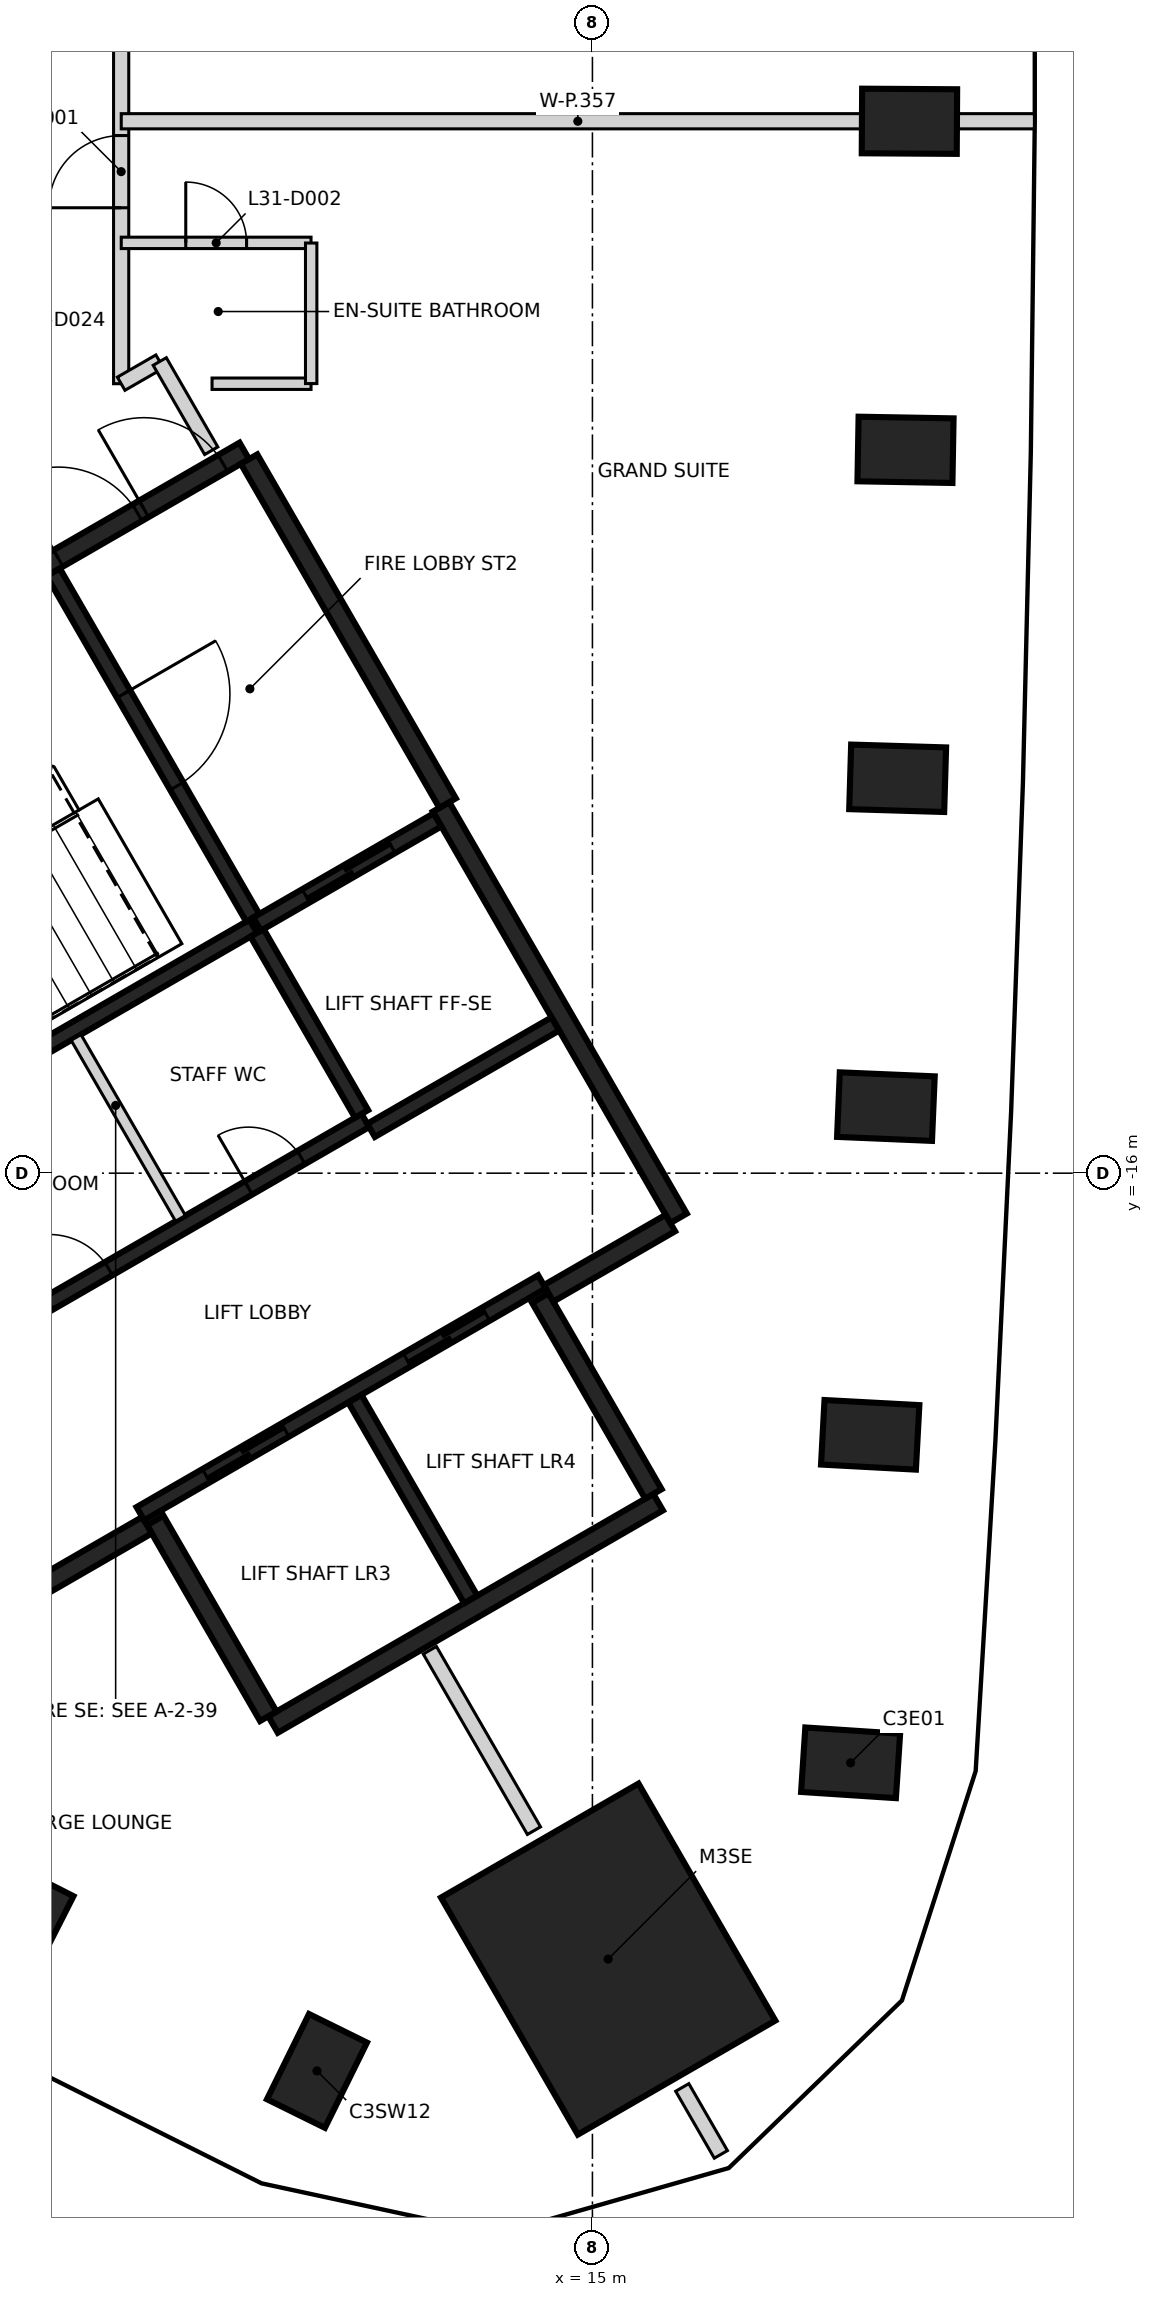
"""IFC4 building model, lengths in metres.
Left out: names, types, materials, properties, quantities, classifications, styles, units other than length and angle.
Written with IfcOpenShell. Run it as: python <this file> out.ifc"""

import sys

from ifc_helpers import new_model, si_unit, direction, frame, frame_2d, origin, origin_2d, place, context, subcontext, project, spatial, rectangle, extrude, element, fill, save


model = new_model("IFC4")
c1 = context("Model", 3, precision=1e-05, world=origin(), true_north=direction((0.0, 1.0)))
c2 = subcontext(c1, "Body", "Model", "MODEL_VIEW")
j1 = project(units=[si_unit("LENGTHUNIT", "METRE"), si_unit("PLANEANGLEUNIT", "RADIAN")], contexts=[c1])
p1 = place(None, origin())
s1 = spatial("IfcSite", under=j1, at=p1, CompositionType="ELEMENT")
p2 = place(p1, origin())
s2 = spatial("IfcBuilding", under=s1, at=p2, CompositionType="ELEMENT")
p3 = place(p2, frame((0.0, 0.0, 128.8)))
s3 = spatial("IfcBuildingStorey", under=s2, at=p3, CompositionType="ELEMENT", Elevation=128.8)
for number, where, z_axis, x_axis in (
    (1, (18.397, -23.757, -0.4), (0.0, 0.0, 1.0), (-0.998, 0.065, 0.0)),
    (2, (18.655, -19.442, -0.4), (0.0, 0.0, 1.0), (-0.999, 0.054, 0.0)),
    (3, (18.861, -15.124, -0.4), (0.0, 0.0, 1.0), (-0.999, 0.042, 0.0)),
    (4, (19.016, -10.805, -0.4), (0.0, 0.0, 1.0), (-1.0, 0.03, 0.0)),
    (5, (19.119, -6.484, -0.4), (0.0, 0.0, 1.0), (-1.0, 0.018, 0.0)),
    (6, (19.171, -2.161, -0.4), (0.0, 0.0, 1.0), (-1.0, 0.006, 0.0)),
    (7, (7.51, -25.876, -0.4), (0.0, 0.0, 1.0), (0.453, 0.892, 0.0)),
    (8, (11.376, -27.811, -0.4), (0.0, 0.0, 1.0), (0.442, 0.897, 0.0)),
):
    element("IfcColumn", number, at=place(p3, frame(where, z_axis=z_axis, x_axis=x_axis)), inside=s3, PredefinedType="COLUMN", context=c2, shape_type="SweptSolid", body=[
        extrude(rectangle(XDim=1.25, YDim=0.85, at=origin_2d()), origin(), (0.0, 0.0, 1.0), 3.6),
    ])
p4 = place(p3, frame((15.207, -26.34, -0.4), z_axis=(0.0, 0.0, 1.0), x_axis=(-0.5, 0.866025403784, 0.0)))
e9 = element("IfcColumn", 9, at=p4, inside=s3, PredefinedType="COLUMN", context=c2, shape_type="SweptSolid", body=[
    extrude(rectangle(XDim=3.6, YDim=3.0, at=origin_2d()), origin(), (0.0, 0.0, 1.0), 3.6),
])
p5 = place(p3, frame((0.417, -12.273, 0.0), z_axis=(0.0, 0.0, 1.0), x_axis=(0.866021906294, 0.500006057782, 0.0)))
e10 = element("IfcWall", 10, at=p5, inside=s3, PredefinedType="SHEAR", context=c2, shape_type="SweptSolid", body=[
    extrude(rectangle(XDim=11.55, YDim=0.25, at=frame_2d((5.775, 0.0))), origin(), (0.0, 0.0, 1.0), 3.2),
])
p6 = place(p5, frame((10.025, 0.0, 0.0)))
e11 = element("IfcOpeningElement", 11, at=p6, cuts=e10, PredefinedType="OPENING", context=c2, shape_type="SweptSolid", body=[
    extrude(rectangle(XDim=1.2, YDim=2.1, at=frame_2d((0.6, 1.05))), frame((0.0, 0.135, 0.0), z_axis=(0.0, -1.0, 0.0), x_axis=(1.0, 0.0, 0.0)), (0.0, 0.0, 1.0), 0.27),
])
p7 = place(p5, frame((8.725, 0.0, 0.0)))
e12 = element("IfcOpeningElement", 12, at=p7, cuts=e10, PredefinedType="OPENING", context=c2, shape_type="SweptSolid", body=[
    extrude(rectangle(XDim=1.2, YDim=2.1, at=frame_2d((0.6, 1.05))), frame((0.0, 0.135, 0.0), z_axis=(0.0, -1.0, 0.0), x_axis=(1.0, 0.0, 0.0)), (0.0, 0.0, 1.0), 0.27),
])
p8 = place(p3, frame((13.008, -11.181, 0.0), z_axis=(0.0, 0.0, 1.0), x_axis=(0.500004234368, -0.866022959057, 0.0)))
e13 = element("IfcWall", 13, at=p8, inside=s3, PredefinedType="SHEAR", context=c2, shape_type="SweptSolid", body=[
    extrude(rectangle(XDim=6.25, YDim=0.25, at=frame_2d((3.125, 0.0))), origin(), (0.0, 0.0, 1.0), 3.2),
])
p9 = place(p3, frame((15.865, -20.328, 0.0), z_axis=(0.0, 0.0, 1.0), x_axis=(-0.86602852612, -0.499994591916, 0.0)))
e14 = element("IfcWall", 14, at=p9, inside=s3, PredefinedType="SHEAR", context=c2, shape_type="SweptSolid", body=[
    extrude(rectangle(XDim=5.85, YDim=0.25, at=frame_2d((2.925, 0.0))), origin(), (0.0, 0.0, 1.0), 3.2),
])
p10 = place(p3, frame((10.483, -6.606, 0.0), z_axis=(0.0, 0.0, 1.0), x_axis=(0.49999885962, -0.866026062182, 0.0)))
e15 = element("IfcWall", 15, at=p10, inside=s3, PredefinedType="SHEAR", context=c2, shape_type="SweptSolid", body=[
    extrude(rectangle(XDim=5.225, YDim=0.25, at=frame_2d((2.612, 0.0))), origin(), (0.0, 0.0, 1.0), 3.2),
])
for number, where, z_axis, x_axis in (
    (16, (14.315, -17.644, 0.0), (0.0, 0.0, 1.0), (0.5, -0.866, 0.0)),
    (17, (10.736, -23.145, 0.0), (0.0, 0.0, 1.0), (-0.5, 0.866, 0.0)),
):
    element("IfcWall", number, at=place(p3, frame(where, z_axis=z_axis, x_axis=x_axis)), inside=s3, PredefinedType="SHEAR", context=c2, shape_type="SweptSolid", body=[
        extrude(rectangle(XDim=2.974, YDim=0.25, at=frame_2d((1.487, 0.0))), origin(), (0.0, 0.0, 1.0), 3.2),
    ])
p11 = place(p3, frame((9.14, -20.631, 0.0), z_axis=(0.0, 0.0, 1.0), x_axis=(-0.866043531843, -0.499968599967, 0.0)))
e18 = element("IfcWall", 18, at=p11, inside=s3, PredefinedType="SHEAR", context=c2, shape_type="SweptSolid", body=[
    extrude(rectangle(XDim=1.975, YDim=0.25, at=frame_2d((0.987, 0.0))), origin(), (0.0, 0.0, 1.0), 3.2),
])
p12 = place(p3, frame((16.025, -16.656, 0.0), z_axis=(0.0, 0.0, 1.0), x_axis=(-0.866016279763, -0.500015802937, 0.0)))
e19 = element("IfcWall", 19, at=p12, inside=s3, PredefinedType="SHEAR", context=c2, shape_type="SweptSolid", body=[
    extrude(rectangle(XDim=1.849, YDim=0.25, at=frame_2d((0.925, 0.0))), origin(), (0.0, 0.0, 1.0), 3.2),
])
p13 = place(p3, frame((9.052, -20.48, 0.0), z_axis=(0.0, 0.0, 1.0), x_axis=(0.866030299012, 0.499991521122, 0.0)))
e20 = element("IfcWall", 20, at=p13, inside=s3, PredefinedType="SHEAR", context=c2, shape_type="SweptSolid", body=[
    extrude(rectangle(XDim=6.1, YDim=0.2, at=frame_2d((3.05, 0.0))), origin(), (0.0, 0.0, 1.0), 3.2),
])
p14 = place(p13, frame((1.0, 0.0, 0.0)))
e21 = element("IfcOpeningElement", 21, at=p14, cuts=e20, PredefinedType="OPENING", context=c2, shape_type="SweptSolid", body=[
    extrude(rectangle(XDim=1.2, YDim=2.1, at=frame_2d((0.6, 1.05))), frame((0.0, 0.11, 0.0), z_axis=(0.0, -1.0, 0.0), x_axis=(1.0, 0.0, 0.0)), (0.0, 0.0, 1.0), 0.22),
])
p15 = place(p13, frame((4.05, 0.0, 0.0)))
e22 = element("IfcOpeningElement", 22, at=p15, cuts=e20, PredefinedType="OPENING", context=c2, shape_type="SweptSolid", body=[
    extrude(rectangle(XDim=1.2, YDim=2.1, at=frame_2d((0.6, 1.05))), frame((0.0, 0.11, 0.0), z_axis=(0.0, -1.0, 0.0), x_axis=(1.0, 0.0, 0.0)), (0.0, 0.0, 1.0), 0.22),
])
p16 = place(p3, frame((10.538, -12.752, 0.0), z_axis=(0.0, 0.0, 1.0), x_axis=(-0.866038630372, -0.499977090179, 0.0)))
e23 = element("IfcWall", 23, at=p16, inside=s3, PredefinedType="SHEAR", context=c2, shape_type="SweptSolid", body=[
    extrude(rectangle(XDim=5.699, YDim=0.2, at=frame_2d((2.85, 0.0))), origin(), (0.0, 0.0, 1.0), 3.2),
])
p17 = place(p3, frame((7.077, -18.156, 0.0), z_axis=(0.0, 0.0, 1.0), x_axis=(0.866038630372, 0.499977090179, 0.0)))
e24 = element("IfcWall", 24, at=p17, inside=s3, PredefinedType="SHEAR", context=c2, shape_type="SweptSolid", body=[
    extrude(rectangle(XDim=5.699, YDim=0.2, at=frame_2d((2.85, 0.0))), origin(), (0.0, 0.0, 1.0), 3.2),
])
p18 = place(p17, frame((0.899, 0.0, 0.0)))
e25 = element("IfcOpeningElement", 25, at=p18, cuts=e24, PredefinedType="OPENING", context=c2, shape_type="SweptSolid", body=[
    extrude(rectangle(XDim=0.9, YDim=2.1, at=frame_2d((0.45, 1.05))), frame((0.0, 0.11, 0.0), z_axis=(0.0, -1.0, 0.0), x_axis=(1.0, 0.0, 0.0)), (0.0, 0.0, 1.0), 0.22),
])
p19 = place(p17, frame((3.924, 0.0, 0.0)))
e26 = element("IfcOpeningElement", 26, at=p19, cuts=e24, PredefinedType="OPENING", context=c2, shape_type="SweptSolid", body=[
    extrude(rectangle(XDim=0.8, YDim=2.1, at=frame_2d((0.4, 1.05))), frame((0.0, 0.11, 0.0), z_axis=(0.0, -1.0, 0.0), x_axis=(1.0, 0.0, 0.0)), (0.0, 0.0, 1.0), 0.22),
])
p20 = place(p3, frame((7.906, -8.094, 0.0), z_axis=(0.0, 0.0, 1.0), x_axis=(0.500024287448, -0.866011380966, 0.0)))
e27 = element("IfcWall", 27, at=p20, inside=s3, PredefinedType="SHEAR", context=c2, shape_type="SweptSolid", body=[
    extrude(rectangle(XDim=5.251, YDim=0.2, at=frame_2d((2.625, 0.0))), origin(), (0.0, 0.0, 1.0), 3.2),
])
p21 = place(p20, frame((1.849, 0.0, 0.0)))
e28 = element("IfcOpeningElement", 28, at=p21, cuts=e27, PredefinedType="OPENING", context=c2, shape_type="SweptSolid", body=[
    extrude(rectangle(XDim=1.4, YDim=2.1, at=frame_2d((0.7, 1.05))), frame((0.0, 0.11, 0.0), z_axis=(0.0, -1.0, 0.0), x_axis=(1.0, 0.0, 0.0)), (0.0, 0.0, 1.0), 0.22),
])
p22 = place(p3, frame((11.875, -18.967, 0.0), z_axis=(0.0, 0.0, 1.0), x_axis=(0.49998131003, -0.866036194175, 0.0)))
e29 = element("IfcWall", 29, at=p22, inside=s3, PredefinedType="SHEAR", context=c2, shape_type="SweptSolid", body=[
    extrude(rectangle(XDim=3.048, YDim=0.2, at=frame_2d((1.524, 0.0))), origin(), (0.0, 0.0, 1.0), 3.2),
])
p23 = place(p3, frame((11.963, -15.22, 0.0), z_axis=(0.0, 0.0, 1.0), x_axis=(-0.500034990121, 0.866005201286, 0.0)))
e30 = element("IfcWall", 30, at=p23, inside=s3, PredefinedType="SHEAR", context=c2, shape_type="SweptSolid", body=[
    extrude(rectangle(XDim=2.75, YDim=0.2, at=frame_2d((1.375, 0.0))), origin(), (0.0, 0.0, 1.0), 3.2),
])
p24 = place(p3, frame((10.587, -12.723, 0.0), z_axis=(0.0, 0.0, 1.0), x_axis=(0.866037306777, 0.499979382845, 0.0)))
e31 = element("IfcWall", 31, at=p24, inside=s3, PredefinedType="SHEAR", context=c2, shape_type="SweptSolid", body=[
    extrude(rectangle(XDim=2.742, YDim=0.2, at=frame_2d((1.371, 0.0))), origin(), (0.0, 0.0, 1.0), 3.2),
])
p25 = place(p24, frame((0.743, 0.0, 0.0)))
e32 = element("IfcOpeningElement", 32, at=p25, cuts=e31, PredefinedType="OPENING", context=c2, shape_type="SweptSolid", body=[
    extrude(rectangle(XDim=1.3, YDim=2.1, at=frame_2d((0.65, 1.05))), frame((0.0, 0.11, 0.0), z_axis=(0.0, -1.0, 0.0), x_axis=(1.0, 0.0, 0.0)), (0.0, 0.0, 1.0), 0.22),
])
p26 = place(p3, frame((14.512, -14.037, 0.0), z_axis=(0.0, 0.0, 1.0), x_axis=(-0.866044696403, -0.499966582715, 0.0)))
e33 = element("IfcWall", 33, at=p26, inside=s3, PredefinedType="SHEAR", context=c2, shape_type="SweptSolid", body=[
    extrude(rectangle(XDim=2.799, YDim=0.2, at=frame_2d((1.399, 0.0))), origin(), (0.0, 0.0, 1.0), 3.2),
])
p27 = place(p3, frame((8.207, -14.214, 0.0), z_axis=(0.0, 0.0, 1.0), x_axis=(0.50002746344, -0.86600954718, 0.0)))
e34 = element("IfcWall", 34, at=p27, inside=s3, PredefinedType="PARTITIONING", context=c2, shape_type="SweptSolid", body=[
    extrude(rectangle(XDim=2.748, YDim=0.15, at=frame_2d((1.374, 0.0))), origin(), (0.0, 0.0, 1.0), 3.2),
])
p28 = place(p3, frame((8.8, -5.614, 0.0), z_axis=(0.0, 0.0, 1.0), x_axis=(0.0, 1.0, 0.0)))
e35 = element("IfcWall", 35, at=p28, inside=s3, PredefinedType="PARTITIONING", context=c2, shape_type="SweptSolid", body=[
    extrude(rectangle(XDim=9.692, YDim=0.2, at=frame_2d((4.846, 0.0))), origin(), (0.0, 0.0, 1.0), 3.2),
])
p29 = place(p28, frame((2.315, 0.0, 0.0)))
e36 = element("IfcOpeningElement", 36, at=p29, cuts=e35, PredefinedType="OPENING", context=c2, shape_type="SweptSolid", body=[
    extrude(rectangle(XDim=0.95, YDim=2.1, at=frame_2d((0.475, 1.05))), frame((0.0, 0.11, 0.0), z_axis=(0.0, -1.0, 0.0), x_axis=(1.0, 0.0, 0.0)), (0.0, 0.0, 1.0), 0.22),
])
p30 = place(p28, frame((5.114, 0.0, 0.0)))
e37 = element("IfcOpeningElement", 37, at=p30, cuts=e35, PredefinedType="OPENING", context=c2, shape_type="SweptSolid", body=[
    extrude(rectangle(XDim=1.0, YDim=2.1, at=frame_2d((0.5, 1.05))), frame((0.0, 0.11, 0.0), z_axis=(0.0, -1.0, 0.0), x_axis=(1.0, 0.0, 0.0)), (0.0, 0.0, 1.0), 0.22),
])
p31 = place(p3, frame((8.8, -5.614, 0.0), z_axis=(0.0, 0.0, 1.0), x_axis=(0.866491166515, 0.499192406143, 0.0)))
e38 = element("IfcWall", 38, at=p31, inside=s3, PredefinedType="PARTITIONING", context=c2, shape_type="SweptSolid", body=[
    extrude(rectangle(XDim=0.585, YDim=0.2, at=frame_2d((0.292, 0.0))), origin(), (0.0, 0.0, 1.0), 3.2),
])
p32 = place(p3, frame((9.308, -5.322, 0.0), z_axis=(0.0, 0.0, 1.0), x_axis=(0.499644515495, -0.866230545603, 0.0)))
e39 = element("IfcWall", 39, at=p32, inside=s3, PredefinedType="PARTITIONING", context=c2, shape_type="SweptSolid", body=[
    extrude(rectangle(XDim=1.356, YDim=0.2, at=frame_2d((0.678, 0.0))), origin(), (0.0, 0.0, 1.0), 3.2),
])
p33 = place(p3, frame((8.801, -2.161, 0.0), z_axis=(0.0, 0.0, 1.0), x_axis=(1.0, 0.0, 0.0)))
e40 = element("IfcWall", 40, at=p33, inside=s3, PredefinedType="PARTITIONING", context=c2, shape_type="SweptSolid", body=[
    extrude(rectangle(XDim=12.014, YDim=0.2, at=frame_2d((6.007, 0.0))), origin(), (0.0, 0.0, 1.0), 3.2),
])
p34 = place(p3, frame((12.861, -22.276, 0.0), z_axis=(0.0, 0.0, 1.0), x_axis=(0.49982784299, -0.866124775868, 0.0)))
e41 = element("IfcWall", 41, at=p34, inside=s3, PredefinedType="PARTITIONING", context=c2, shape_type="SweptSolid", body=[
    extrude(rectangle(XDim=2.741, YDim=0.2, at=frame_2d((1.37, 0.0))), origin(), (0.0, 0.0, 1.0), 3.2),
])
p35 = place(p3, frame((16.182, -28.028, 0.0), z_axis=(0.0, 0.0, 1.0), x_axis=(0.499625455419, -0.866241539236, 0.0)))
e42 = element("IfcWall", 42, at=p35, inside=s3, PredefinedType="PARTITIONING", context=c2, shape_type="SweptSolid", body=[
    extrude(rectangle(XDim=1.017, YDim=0.2, at=frame_2d((0.508, 0.0))), origin(), (0.0, 0.0, 1.0), 3.2),
])
p36 = place(p3, frame((8.801, -3.761, 0.0), z_axis=(0.0, 0.0, 1.0), x_axis=(1.0, 0.0, 0.0)))
e43 = element("IfcWall", 43, at=p36, inside=s3, PredefinedType="PARTITIONING", context=c2, shape_type="SweptSolid", body=[
    extrude(rectangle(XDim=2.497, YDim=0.15, at=frame_2d((1.249, 0.0))), origin(), (0.0, 0.0, 1.0), 3.2),
])
p37 = place(p36, frame((0.849, 0.0, 0.0)))
e44 = element("IfcOpeningElement", 44, at=p37, cuts=e43, PredefinedType="OPENING", context=c2, shape_type="SweptSolid", body=[
    extrude(rectangle(XDim=0.8, YDim=2.1, at=frame_2d((0.4, 1.05))), frame((0.0, 0.085, 0.0), z_axis=(0.0, -1.0, 0.0), x_axis=(1.0, 0.0, 0.0)), (0.0, 0.0, 1.0), 0.17),
])
p38 = place(p3, frame((11.298, -5.614, 0.0), z_axis=(0.0, 0.0, 1.0), x_axis=(-1.0, 0.0, 0.0)))
e45 = element("IfcWall", 45, at=p38, inside=s3, PredefinedType="PARTITIONING", context=c2, shape_type="SweptSolid", body=[
    extrude(rectangle(XDim=1.302, YDim=0.15, at=frame_2d((0.651, 0.0))), origin(), (0.0, 0.0, 1.0), 3.2),
])
p39 = place(p3, frame((11.3, -5.612, 0.0), z_axis=(0.0, 0.0, 1.0), x_axis=(0.0, 1.0, 0.0)))
e46 = element("IfcWall", 46, at=p39, inside=s3, PredefinedType="PARTITIONING", context=c2, shape_type="SweptSolid", body=[
    extrude(rectangle(XDim=1.849, YDim=0.15, at=frame_2d((0.925, 0.0))), origin(), (0.0, 0.0, 1.0), 3.2),
])
p40 = place(p25, origin())
e47 = element("IfcDoor", 47, at=p40, inside=s3, OperationType="SLIDING_TO_RIGHT", PredefinedType="DOOR", context=c2, shape_type="SweptSolid", body=[
    extrude(rectangle(XDim=1.3, YDim=2.1, at=frame_2d((0.65, 1.05))), frame((0.0, 0.025, 0.0), z_axis=(0.0, -1.0, 0.0), x_axis=(1.0, 0.0, 0.0)), (0.0, 0.0, 1.0), 0.05),
])
fill(e32, e47)
p41 = place(p14, origin())
e48 = element("IfcDoor", 48, at=p41, inside=s3, OperationType="DOUBLE_DOOR_SLIDING", PredefinedType="DOOR", context=c2, shape_type="SweptSolid", body=[
    extrude(rectangle(XDim=1.2, YDim=2.1, at=frame_2d((0.6, 1.05))), frame((0.0, 0.025, 0.0), z_axis=(0.0, -1.0, 0.0), x_axis=(1.0, 0.0, 0.0)), (0.0, 0.0, 1.0), 0.05),
])
fill(e21, e48)
p42 = place(p15, origin())
e49 = element("IfcDoor", 49, at=p42, inside=s3, OperationType="DOUBLE_DOOR_SLIDING", PredefinedType="DOOR", context=c2, shape_type="SweptSolid", body=[
    extrude(rectangle(XDim=1.2, YDim=2.1, at=frame_2d((0.6, 1.05))), frame((0.0, 0.025, 0.0), z_axis=(0.0, -1.0, 0.0), x_axis=(1.0, 0.0, 0.0)), (0.0, 0.0, 1.0), 0.05),
])
fill(e22, e49)
p43 = place(p6, origin())
e50 = element("IfcDoor", 50, at=p43, inside=s3, OperationType="SINGLE_SWING_LEFT", PredefinedType="DOOR", context=c2, shape_type="SweptSolid", body=[
    extrude(rectangle(XDim=1.2, YDim=2.1, at=frame_2d((0.6, 1.05))), frame((0.0, 0.025, 0.0), z_axis=(0.0, -1.0, 0.0), x_axis=(1.0, 0.0, 0.0)), (0.0, 0.0, 1.0), 0.05),
])
fill(e11, e50)
p44 = place(p7, origin())
e51 = element("IfcDoor", 51, at=p44, inside=s3, OperationType="SINGLE_SWING_RIGHT", PredefinedType="DOOR", context=c2, shape_type="SweptSolid", body=[
    extrude(rectangle(XDim=1.2, YDim=2.1, at=frame_2d((0.6, 1.05))), frame((0.0, 0.025, 0.0), z_axis=(0.0, -1.0, 0.0), x_axis=(1.0, 0.0, 0.0)), (0.0, 0.0, 1.0), 0.05),
])
fill(e12, e51)
p45 = place(p21, origin())
e52 = element("IfcDoor", 52, at=p45, inside=s3, OperationType="SINGLE_SWING_RIGHT", PredefinedType="DOOR", context=c2, shape_type="SweptSolid", body=[
    extrude(rectangle(XDim=1.4, YDim=2.1, at=frame_2d((0.7, 1.05))), frame((0.0, 0.025, 0.0), z_axis=(0.0, -1.0, 0.0), x_axis=(1.0, 0.0, 0.0)), (0.0, 0.0, 1.0), 0.05),
])
fill(e28, e52)
p46 = place(p18, origin())
e53 = element("IfcDoor", 53, at=p46, inside=s3, OperationType="SINGLE_SWING_LEFT", PredefinedType="DOOR", context=c2, shape_type="SweptSolid", body=[
    extrude(rectangle(XDim=0.9, YDim=2.1, at=frame_2d((0.45, 1.05))), frame((0.0, 0.025, 0.0), z_axis=(0.0, -1.0, 0.0), x_axis=(1.0, 0.0, 0.0)), (0.0, 0.0, 1.0), 0.05),
])
fill(e25, e53)
p47 = place(p19, origin())
e54 = element("IfcDoor", 54, at=p47, inside=s3, OperationType="SINGLE_SWING_RIGHT", PredefinedType="DOOR", context=c2, shape_type="SweptSolid", body=[
    extrude(rectangle(XDim=0.8, YDim=2.1, at=frame_2d((0.4, 1.05))), frame((0.0, 0.025, 0.0), z_axis=(0.0, -1.0, 0.0), x_axis=(1.0, 0.0, 0.0)), (0.0, 0.0, 1.0), 0.05),
])
fill(e26, e54)
p48 = place(p29, frame((0.95, 0.0, 0.0), z_axis=(0.0, 0.0, 1.0), x_axis=(-1.0, 0.0, 0.0)))
e55 = element("IfcDoor", 55, at=p48, inside=s3, OperationType="SINGLE_SWING_LEFT", PredefinedType="DOOR", context=c2, shape_type="SweptSolid", body=[
    extrude(rectangle(XDim=0.95, YDim=2.1, at=frame_2d((0.475, 1.05))), frame((0.0, 0.025, 0.0), z_axis=(0.0, -1.0, 0.0), x_axis=(1.0, 0.0, 0.0)), (0.0, 0.0, 1.0), 0.05),
])
fill(e36, e55)
p49 = place(p37, frame((0.8, 0.0, 0.0), z_axis=(0.0, 0.0, 1.0), x_axis=(-1.0, 0.0, 0.0)))
e56 = element("IfcDoor", 56, at=p49, inside=s3, OperationType="SINGLE_SWING_LEFT", PredefinedType="DOOR", context=c2, shape_type="SweptSolid", body=[
    extrude(rectangle(XDim=0.8, YDim=2.1, at=frame_2d((0.4, 1.05))), frame((0.0, 0.025, 0.0), z_axis=(0.0, -1.0, 0.0), x_axis=(1.0, 0.0, 0.0)), (0.0, 0.0, 1.0), 0.05),
])
fill(e44, e56)
save(model, sys.argv[1])
